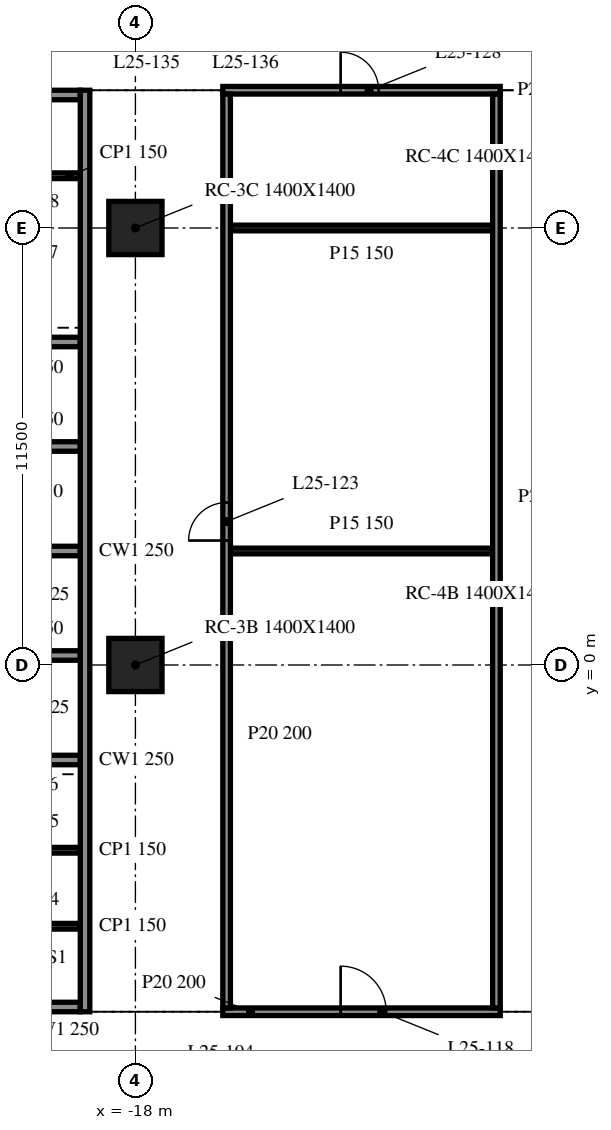
"""IFC4 building model, lengths in metres.
Left out: names, types, materials, properties, quantities, classifications, styles, units other than length and angle.
Written with IfcOpenShell. Run it as: python <this file> out.ifc"""

import sys

from ifc_helpers import new_model, si_unit, direction, frame, frame_2d, origin, origin_2d, place, context, subcontext, project, spatial, rectangle, extrude, element, fill, save


model = new_model("IFC4")
c1 = context("Model", 3, precision=1e-05, world=origin(), true_north=direction((0.0, 1.0)))
c2 = subcontext(c1, "Body", "Model", "MODEL_VIEW")
j1 = project(units=[si_unit("LENGTHUNIT", "METRE"), si_unit("PLANEANGLEUNIT", "RADIAN")], contexts=[c1])
p1 = place(None, origin())
s1 = spatial("IfcSite", under=j1, at=p1, CompositionType="ELEMENT")
p2 = place(p1, origin())
s2 = spatial("IfcBuilding", under=s1, at=p2, CompositionType="ELEMENT")
p3 = place(p2, frame((0.0, 0.0, 109.4)))
s3 = spatial("IfcBuildingStorey", under=s2, at=p3, CompositionType="ELEMENT", Elevation=109.4)
for number, where, z_axis, x_axis in (
    (1, (-18.0, 0.0, -0.34), (0.0, 0.0, 1.0), (1.0, 0.0, 0.0)),
    (2, (-18.0, 11.5, -0.34), (0.0, 0.0, 1.0), (1.0, 0.0, 0.0)),
):
    element("IfcColumn", number, at=place(p3, frame(where, z_axis=z_axis, x_axis=x_axis)), inside=s3, PredefinedType="COLUMN", context=c2, shape_type="SweptSolid", body=[
        extrude(rectangle(XDim=1.4, YDim=1.4, at=origin_2d()), origin(), (0.0, 0.0, 1.0), 4.1),
    ])
p4 = place(p3, frame((-19.325, -9.125, 0.0), z_axis=(0.0, 0.0, 1.0), x_axis=(0.0, 1.0, 0.0)))
e3 = element("IfcWall", 3, at=p4, inside=s3, PredefinedType="SOLIDWALL", context=c2, shape_type="SweptSolid", body=[
    extrude(rectangle(XDim=24.25, YDim=0.25, at=frame_2d((12.125, 0.0))), origin(), (0.0, 0.0, 1.0), 3.76),
])
p5 = place(p3, frame((-19.45, -9.0, 0.0), z_axis=(0.0, 0.0, 1.0), x_axis=(-1.0, 0.0, 0.0)))
e4 = element("IfcWall", 4, at=p5, inside=s3, PredefinedType="SOLIDWALL", context=c2, shape_type="SweptSolid", body=[
    extrude(rectangle(XDim=9.1, YDim=0.25, at=frame_2d((4.55, 0.0))), origin(), (0.0, 0.0, 1.0), 3.76),
])
p6 = place(p5, frame((3.65, 0.0, 0.0)))
e5 = element("IfcOpeningElement", 5, at=p6, cuts=e4, PredefinedType="OPENING", context=c2, shape_type="SweptSolid", body=[
    extrude(rectangle(XDim=1.8, YDim=2.1, at=frame_2d((0.9, 1.05))), frame((0.0, 0.135, 0.0), z_axis=(0.0, -1.0, 0.0), x_axis=(1.0, 0.0, 0.0)), (0.0, 0.0, 1.0), 0.27),
])
p7 = place(p3, frame((-28.55, 15.0, 0.0), z_axis=(0.0, 0.0, 1.0), x_axis=(1.0, 0.0, 0.0)))
e6 = element("IfcWall", 6, at=p7, inside=s3, PredefinedType="SOLIDWALL", context=c2, shape_type="SweptSolid", body=[
    extrude(rectangle(XDim=9.1, YDim=0.25, at=frame_2d((4.55, 0.0))), origin(), (0.0, 0.0, 1.0), 3.76),
])
p8 = place(p7, frame((3.65, 0.0, 0.0)))
e7 = element("IfcOpeningElement", 7, at=p8, cuts=e6, PredefinedType="OPENING", context=c2, shape_type="SweptSolid", body=[
    extrude(rectangle(XDim=1.8, YDim=2.1, at=frame_2d((0.9, 1.05))), frame((0.0, 0.135, 0.0), z_axis=(0.0, -1.0, 0.0), x_axis=(1.0, 0.0, 0.0)), (0.0, 0.0, 1.0), 0.27),
])
for number, where, z_axis, x_axis in (
    (8, (-22.3, -2.5, 0.0), (0.0, 0.0, 1.0), (1.0, 0.0, 0.0)),
    (9, (-22.3, 0.25, 0.0), (0.0, 0.0, 1.0), (1.0, 0.0, 0.0)),
    (10, (-22.3, 3.0, 0.0), (0.0, 0.0, 1.0), (1.0, 0.0, 0.0)),
    (11, (-22.3, 5.75, 0.0), (0.0, 0.0, 1.0), (1.0, 0.0, 0.0)),
    (12, (-22.3, 8.5, 0.0), (0.0, 0.0, 1.0), (1.0, 0.0, 0.0)),
):
    element("IfcWall", number, at=place(p3, frame(where, z_axis=z_axis, x_axis=x_axis)), inside=s3, PredefinedType="SOLIDWALL", context=c2, shape_type="SweptSolid", body=[
        extrude(rectangle(XDim=2.85, YDim=0.25, at=frame_2d((1.425, 0.0))), origin(), (0.0, 0.0, 1.0), 3.76),
    ])
for number, where, z_axis, x_axis in (
    (13, (-22.3, -6.875, 0.0), (0.0, 0.0, 1.0), (1.0, 0.0, 0.0)),
    (14, (-22.3, -4.875, 0.0), (0.0, 0.0, 1.0), (1.0, 0.0, 0.0)),
    (15, (-22.3, 12.875, 0.0), (0.0, 0.0, 1.0), (1.0, 0.0, 0.0)),
):
    element("IfcWall", number, at=place(p3, frame(where, z_axis=z_axis, x_axis=x_axis)), inside=s3, PredefinedType="PARTITIONING", context=c2, shape_type="SweptSolid", body=[
        extrude(rectangle(XDim=2.85, YDim=0.15, at=frame_2d((1.425, 0.0))), origin(), (0.0, 0.0, 1.0), 3.76),
    ])
p9 = place(p3, frame((-15.7, -9.125, 0.0), z_axis=(0.0, 0.0, 1.0), x_axis=(1.0, 0.0, 0.0)))
e16 = element("IfcWall", 16, at=p9, inside=s3, PredefinedType="PARTITIONING", context=c2, shape_type="SweptSolid", body=[
    extrude(rectangle(XDim=7.3, YDim=0.2, at=frame_2d((3.65, 0.0))), origin(), (0.0, 0.0, 1.0), 3.76),
])
p10 = place(p9, frame((3.1, 0.0, 0.0)))
e17 = element("IfcOpeningElement", 17, at=p10, cuts=e16, PredefinedType="OPENING", context=c2, shape_type="SweptSolid", body=[
    extrude(rectangle(XDim=1.2, YDim=2.1, at=frame_2d((0.6, 1.05))), frame((0.0, 0.11, 0.0), z_axis=(0.0, -1.0, 0.0), x_axis=(1.0, 0.0, 0.0)), (0.0, 0.0, 1.0), 0.22),
])
for number, where, z_axis, x_axis in (
    (18, (-15.5, 3.0, 0.0), (0.0, 0.0, 1.0), (1.0, 0.0, 0.0)),
    (19, (-15.5, 11.5, 0.0), (0.0, 0.0, 1.0), (1.0, 0.0, 0.0)),
):
    element("IfcWall", number, at=place(p3, frame(where, z_axis=z_axis, x_axis=x_axis)), inside=s3, PredefinedType="PARTITIONING", context=c2, shape_type="SweptSolid", body=[
        extrude(rectangle(XDim=6.9, YDim=0.15, at=frame_2d((3.45, 0.0))), origin(), (0.0, 0.0, 1.0), 3.76),
    ])
p11 = place(p3, frame((-15.7, 15.125, 0.0), z_axis=(0.0, 0.0, 1.0), x_axis=(1.0, 0.0, 0.0)))
e20 = element("IfcWall", 20, at=p11, inside=s3, PredefinedType="PARTITIONING", context=c2, shape_type="SweptSolid", body=[
    extrude(rectangle(XDim=7.3, YDim=0.2, at=frame_2d((3.65, 0.0))), origin(), (0.0, 0.0, 1.0), 3.76),
])
p12 = place(p11, frame((3.1, 0.0, 0.0)))
e21 = element("IfcOpeningElement", 21, at=p12, cuts=e20, PredefinedType="OPENING", context=c2, shape_type="SweptSolid", body=[
    extrude(rectangle(XDim=1.0, YDim=2.1, at=frame_2d((0.5, 1.05))), frame((0.0, 0.11, 0.0), z_axis=(0.0, -1.0, 0.0), x_axis=(1.0, 0.0, 0.0)), (0.0, 0.0, 1.0), 0.22),
])
p13 = place(p3, frame((-15.6, -9.025, 0.0), z_axis=(0.0, 0.0, 1.0), x_axis=(0.0, 1.0, 0.0)))
e22 = element("IfcWall", 22, at=p13, inside=s3, PredefinedType="PARTITIONING", context=c2, shape_type="SweptSolid", body=[
    extrude(rectangle(XDim=24.05, YDim=0.2, at=frame_2d((12.025, 0.0))), origin(), (0.0, 0.0, 1.0), 3.76),
])
p14 = place(p13, frame((12.3, 0.0, 0.0)))
e23 = element("IfcOpeningElement", 23, at=p14, cuts=e22, PredefinedType="OPENING", context=c2, shape_type="SweptSolid", body=[
    extrude(rectangle(XDim=1.0, YDim=2.1, at=frame_2d((0.5, 1.05))), frame((0.0, 0.11, 0.0), z_axis=(0.0, -1.0, 0.0), x_axis=(1.0, 0.0, 0.0)), (0.0, 0.0, 1.0), 0.22),
])
p15 = place(p3, frame((-8.5, -9.025, 0.0), z_axis=(0.0, 0.0, 1.0), x_axis=(0.0, 1.0, 0.0)))
e24 = element("IfcWall", 24, at=p15, inside=s3, PredefinedType="PARTITIONING", context=c2, shape_type="SweptSolid", body=[
    extrude(rectangle(XDim=24.05, YDim=0.2, at=frame_2d((12.025, 0.0))), origin(), (0.0, 0.0, 1.0), 3.76),
])
p16 = place(p10, origin())
e25 = element("IfcDoor", 25, at=p16, inside=s3, OperationType="SINGLE_SWING_RIGHT", PredefinedType="DOOR", context=c2, shape_type="SweptSolid", body=[
    extrude(rectangle(XDim=1.2, YDim=2.1, at=frame_2d((0.6, 1.05))), frame((0.0, 0.025, 0.0), z_axis=(0.0, -1.0, 0.0), x_axis=(1.0, 0.0, 0.0)), (0.0, 0.0, 1.0), 0.05),
])
fill(e17, e25)
p17 = place(p14, origin())
e26 = element("IfcDoor", 26, at=p17, inside=s3, OperationType="SINGLE_SWING_LEFT", PredefinedType="DOOR", context=c2, shape_type="SweptSolid", body=[
    extrude(rectangle(XDim=1.0, YDim=2.1, at=frame_2d((0.5, 1.05))), frame((0.0, 0.025, 0.0), z_axis=(0.0, -1.0, 0.0), x_axis=(1.0, 0.0, 0.0)), (0.0, 0.0, 1.0), 0.05),
])
fill(e23, e26)
p18 = place(p12, origin())
e27 = element("IfcDoor", 27, at=p18, inside=s3, OperationType="SINGLE_SWING_RIGHT", PredefinedType="DOOR", context=c2, shape_type="SweptSolid", body=[
    extrude(rectangle(XDim=1.0, YDim=2.1, at=frame_2d((0.5, 1.05))), frame((0.0, 0.025, 0.0), z_axis=(0.0, -1.0, 0.0), x_axis=(1.0, 0.0, 0.0)), (0.0, 0.0, 1.0), 0.05),
])
fill(e21, e27)
save(model, sys.argv[1])
